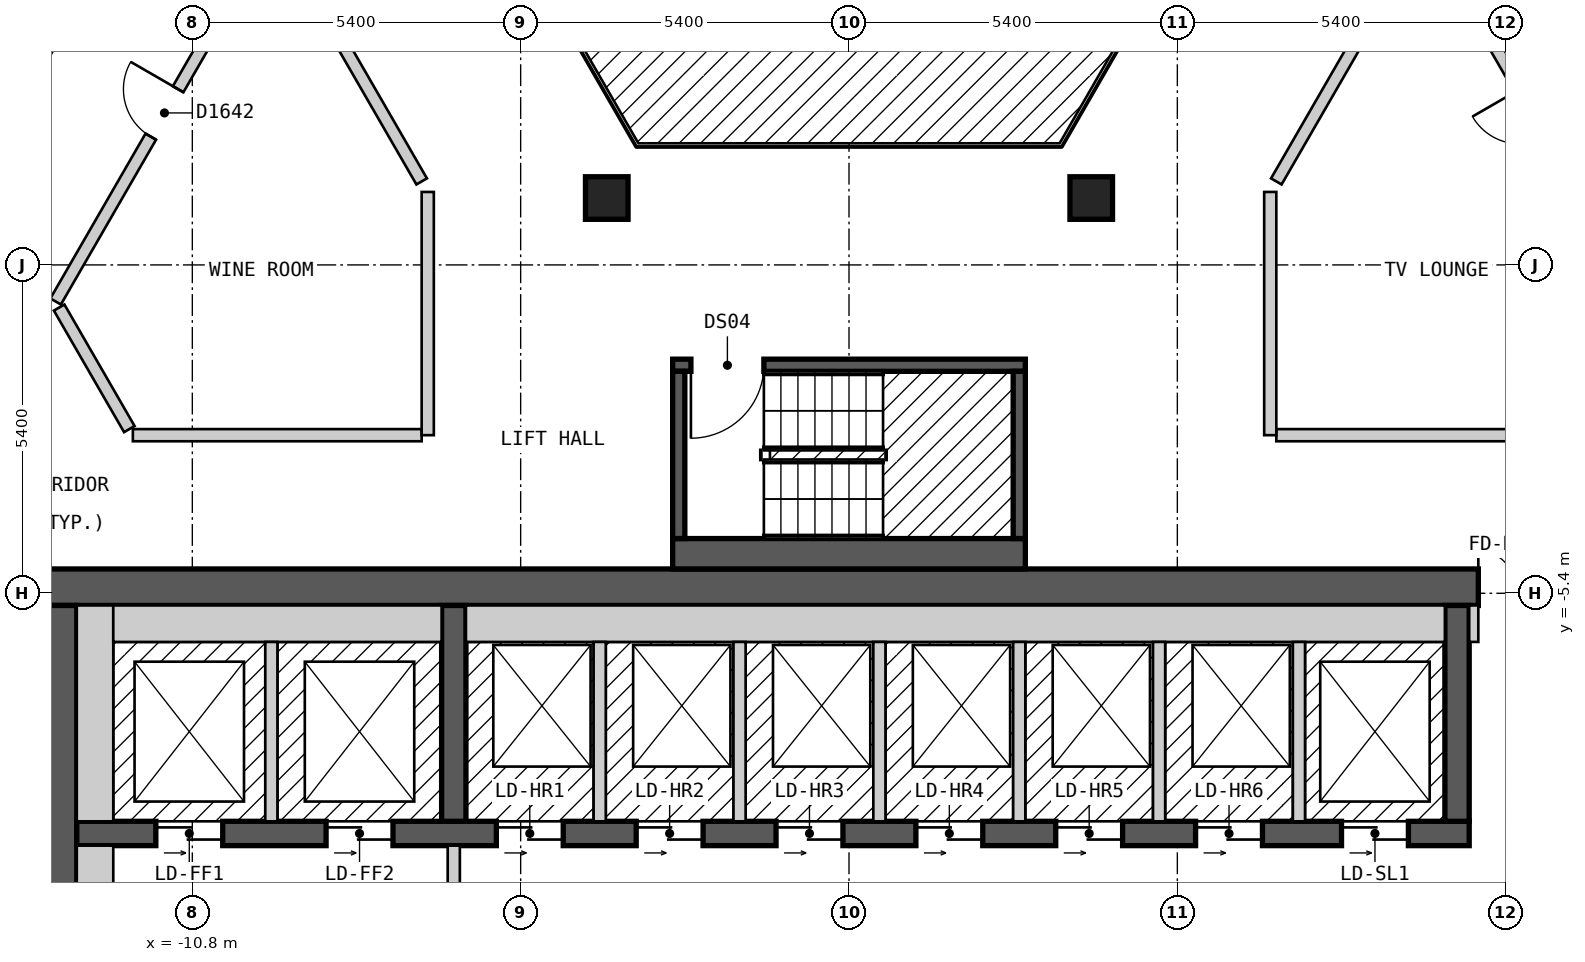
"""IFC4 building model, lengths in metres.
Left out: names, types, materials, properties, quantities, classifications, styles, units other than length and angle.
Written with IfcOpenShell. Run it as: python <this file> out.ifc"""

import sys

from ifc_helpers import new_model, si_unit, direction, frame, frame_2d, origin, origin_2d, place, context, subcontext, project, spatial, rectangle, extrude, element, fill, save


model = new_model("IFC4")
c1 = context("Model", 3, precision=1e-05, world=origin(), true_north=direction((0.0, 1.0)))
c2 = subcontext(c1, "Body", "Model", "MODEL_VIEW")
j1 = project(units=[si_unit("LENGTHUNIT", "METRE"), si_unit("PLANEANGLEUNIT", "RADIAN")], contexts=[c1])
p1 = place(None, origin())
s1 = spatial("IfcSite", under=j1, at=p1, CompositionType="ELEMENT")
p2 = place(p1, origin())
s2 = spatial("IfcBuilding", under=s1, at=p2, CompositionType="ELEMENT")
p3 = place(p2, frame((0.0, 0.0, 169.2)))
s3 = spatial("IfcBuildingStorey", under=s2, at=p3, CompositionType="ELEMENT", Elevation=169.2)
for number, where, z_axis, x_axis in (
    (1, (3.984, 1.1, 0.0), (0.0, 0.0, 1.0), (1.0, 0.0, 0.0)),
    (2, (-3.984, 1.1, 0.0), (0.0, 0.0, 1.0), (1.0, 0.0, 0.0)),
):
    element("IfcColumn", number, at=place(p3, frame(where, z_axis=z_axis, x_axis=x_axis)), inside=s3, PredefinedType="COLUMN", context=c2, shape_type="SweptSolid", body=[
        extrude(rectangle(XDim=0.7, YDim=0.7, at=origin_2d()), origin(), (0.0, 0.0, 1.0), 3.0),
    ])
p4 = place(p3, frame((-13.3, -5.3, 0.0), z_axis=(0.0, 0.0, 1.0), x_axis=(1.0, 0.0, 0.0)))
e3 = element("IfcWall", 3, at=p4, inside=s3, PredefinedType="SHEAR", context=c2, shape_type="SweptSolid", body=[
    extrude(rectangle(XDim=26.6, YDim=0.6, at=frame_2d((13.3, 0.0))), origin(), (0.0, 0.0, 1.0), 2.7),
])
p5 = place(p4, frame((23.65, 0.0, 0.0)))
e4 = element("IfcOpeningElement", 4, at=p5, cuts=e3, PredefinedType="OPENING", context=c2, shape_type="SweptSolid", body=[
    extrude(rectangle(XDim=1.2, YDim=2.1, at=frame_2d((0.6, 1.05))), frame((0.0, 0.31, 0.0), z_axis=(0.0, -1.0, 0.0), x_axis=(1.0, 0.0, 0.0)), (0.0, 0.0, 1.0), 0.62),
])
p6 = place(p3, frame((-13.0, -18.4, 0.0), z_axis=(0.0, 0.0, 1.0), x_axis=(0.0, 1.0, 0.0)))
e5 = element("IfcWall", 5, at=p6, inside=s3, PredefinedType="SHEAR", context=c2, shape_type="SweptSolid", body=[
    extrude(rectangle(XDim=12.8, YDim=0.6, at=frame_2d((6.4, 0.0))), origin(), (0.0, 0.0, 1.0), 2.7),
])
p7 = place(p6, frame((4.2, 0.0, 0.0)))
e6 = element("IfcOpeningElement", 6, at=p7, cuts=e5, PredefinedType="OPENING", context=c2, shape_type="SweptSolid", body=[
    extrude(rectangle(XDim=1.2, YDim=2.1, at=frame_2d((0.6, 1.05))), frame((0.0, 0.31, 0.0), z_axis=(0.0, -1.0, 0.0), x_axis=(1.0, 0.0, 0.0)), (0.0, 0.0, 1.0), 0.62),
])
p8 = place(p3, frame((-12.7, -9.35, 0.0), z_axis=(0.0, 0.0, 1.0), x_axis=(1.0, 0.0, 0.0)))
e7 = element("IfcWall", 7, at=p8, inside=s3, PredefinedType="SHEAR", context=c2, shape_type="SweptSolid", body=[
    extrude(rectangle(XDim=22.9, YDim=0.4, at=frame_2d((11.45, 0.0))), origin(), (0.0, 0.0, 1.0), 2.7),
])
p9 = place(p8, frame((1.3, 0.0, 0.0)))
e8 = element("IfcOpeningElement", 8, at=p9, cuts=e7, PredefinedType="OPENING", context=c2, shape_type="SweptSolid", body=[
    extrude(rectangle(XDim=1.1, YDim=2.1, at=frame_2d((0.55, 1.05))), frame((0.0, 0.21, 0.0), z_axis=(0.0, -1.0, 0.0), x_axis=(1.0, 0.0, 0.0)), (0.0, 0.0, 1.0), 0.42),
])
p10 = place(p8, frame((4.1, 0.0, 0.0)))
e9 = element("IfcOpeningElement", 9, at=p10, cuts=e7, PredefinedType="OPENING", context=c2, shape_type="SweptSolid", body=[
    extrude(rectangle(XDim=1.1, YDim=2.1, at=frame_2d((0.55, 1.05))), frame((0.0, 0.21, 0.0), z_axis=(0.0, -1.0, 0.0), x_axis=(1.0, 0.0, 0.0)), (0.0, 0.0, 1.0), 0.42),
])
p11 = place(p8, frame((6.9, 0.0, 0.0)))
e10 = element("IfcOpeningElement", 10, at=p11, cuts=e7, PredefinedType="OPENING", context=c2, shape_type="SweptSolid", body=[
    extrude(rectangle(XDim=1.1, YDim=2.1, at=frame_2d((0.55, 1.05))), frame((0.0, 0.21, 0.0), z_axis=(0.0, -1.0, 0.0), x_axis=(1.0, 0.0, 0.0)), (0.0, 0.0, 1.0), 0.42),
])
p12 = place(p8, frame((9.2, 0.0, 0.0)))
e11 = element("IfcOpeningElement", 11, at=p12, cuts=e7, PredefinedType="OPENING", context=c2, shape_type="SweptSolid", body=[
    extrude(rectangle(XDim=1.1, YDim=2.1, at=frame_2d((0.55, 1.05))), frame((0.0, 0.21, 0.0), z_axis=(0.0, -1.0, 0.0), x_axis=(1.0, 0.0, 0.0)), (0.0, 0.0, 1.0), 0.42),
])
p13 = place(p8, frame((11.5, 0.0, 0.0)))
e12 = element("IfcOpeningElement", 12, at=p13, cuts=e7, PredefinedType="OPENING", context=c2, shape_type="SweptSolid", body=[
    extrude(rectangle(XDim=1.1, YDim=2.1, at=frame_2d((0.55, 1.05))), frame((0.0, 0.21, 0.0), z_axis=(0.0, -1.0, 0.0), x_axis=(1.0, 0.0, 0.0)), (0.0, 0.0, 1.0), 0.42),
])
p14 = place(p8, frame((13.8, 0.0, 0.0)))
e13 = element("IfcOpeningElement", 13, at=p14, cuts=e7, PredefinedType="OPENING", context=c2, shape_type="SweptSolid", body=[
    extrude(rectangle(XDim=1.1, YDim=2.1, at=frame_2d((0.55, 1.05))), frame((0.0, 0.21, 0.0), z_axis=(0.0, -1.0, 0.0), x_axis=(1.0, 0.0, 0.0)), (0.0, 0.0, 1.0), 0.42),
])
p15 = place(p8, frame((16.1, 0.0, 0.0)))
e14 = element("IfcOpeningElement", 14, at=p15, cuts=e7, PredefinedType="OPENING", context=c2, shape_type="SweptSolid", body=[
    extrude(rectangle(XDim=1.1, YDim=2.1, at=frame_2d((0.55, 1.05))), frame((0.0, 0.21, 0.0), z_axis=(0.0, -1.0, 0.0), x_axis=(1.0, 0.0, 0.0)), (0.0, 0.0, 1.0), 0.42),
])
p16 = place(p8, frame((18.4, 0.0, 0.0)))
e15 = element("IfcOpeningElement", 15, at=p16, cuts=e7, PredefinedType="OPENING", context=c2, shape_type="SweptSolid", body=[
    extrude(rectangle(XDim=1.1, YDim=2.1, at=frame_2d((0.55, 1.05))), frame((0.0, 0.21, 0.0), z_axis=(0.0, -1.0, 0.0), x_axis=(1.0, 0.0, 0.0)), (0.0, 0.0, 1.0), 0.42),
])
p17 = place(p8, frame((20.8, 0.0, 0.0)))
e16 = element("IfcOpeningElement", 16, at=p17, cuts=e7, PredefinedType="OPENING", context=c2, shape_type="SweptSolid", body=[
    extrude(rectangle(XDim=1.1, YDim=2.1, at=frame_2d((0.55, 1.05))), frame((0.0, 0.21, 0.0), z_axis=(0.0, -1.0, 0.0), x_axis=(1.0, 0.0, 0.0)), (0.0, 0.0, 1.0), 0.42),
])
for number, where, z_axis, x_axis in (
    (17, (-6.5, -9.15, 0.0), (0.0, 0.0, 1.0), (0.0, 1.0, 0.0)),
    (18, (10.0, -9.15, 0.0), (0.0, 0.0, 1.0), (0.0, 1.0, 0.0)),
):
    element("IfcWall", number, at=place(p3, frame(where, z_axis=z_axis, x_axis=x_axis)), inside=s3, PredefinedType="SHEAR", context=c2, shape_type="SweptSolid", body=[
        extrude(rectangle(XDim=3.55, YDim=0.4, at=frame_2d((1.775, 0.0))), origin(), (0.0, 0.0, 1.0), 2.7),
    ])
p18 = place(p3, frame((-2.9, -4.75, 0.0), z_axis=(0.0, 0.0, 1.0), x_axis=(1.0, 0.0, 0.0)))
e19 = element("IfcWall", 19, at=p18, inside=s3, PredefinedType="SOLIDWALL", context=c2, shape_type="SweptSolid", body=[
    extrude(rectangle(XDim=5.8, YDim=0.5, at=frame_2d((2.9, 0.0))), origin(), (0.0, 0.0, 1.0), 2.7),
])
p19 = place(p3, frame((-2.9, -1.65, 0.0), z_axis=(0.0, 0.0, 1.0), x_axis=(1.0, 0.0, 0.0)))
e20 = element("IfcWall", 20, at=p19, inside=s3, PredefinedType="SOLIDWALL", context=c2, shape_type="SweptSolid", body=[
    extrude(rectangle(XDim=5.8, YDim=0.2, at=frame_2d((2.9, 0.0))), origin(), (0.0, 0.0, 1.0), 2.7),
])
p20 = place(p19, frame((0.3, 0.0, 0.0)))
e21 = element("IfcOpeningElement", 21, at=p20, cuts=e20, PredefinedType="OPENING", context=c2, shape_type="SweptSolid", body=[
    extrude(rectangle(XDim=1.2, YDim=2.1, at=frame_2d((0.6, 1.05))), frame((0.0, 0.11, 0.0), z_axis=(0.0, -1.0, 0.0), x_axis=(1.0, 0.0, 0.0)), (0.0, 0.0, 1.0), 0.22),
])
for number, where, z_axis, x_axis in (
    (22, (-2.8, -4.5, 0.0), (0.0, 0.0, 1.0), (0.0, 1.0, 0.0)),
    (23, (2.8, -4.5, 0.0), (0.0, 0.0, 1.0), (0.0, 1.0, 0.0)),
):
    element("IfcWall", number, at=place(p3, frame(where, z_axis=z_axis, x_axis=x_axis)), inside=s3, PredefinedType="SOLIDWALL", context=c2, shape_type="SweptSolid", body=[
        extrude(rectangle(XDim=2.75, YDim=0.2, at=frame_2d((1.375, 0.0))), origin(), (0.0, 0.0, 1.0), 2.7),
    ])
p21 = place(p3, frame((-9.411, 5.5, 0.0), z_axis=(0.0, 0.0, 1.0), x_axis=(0.500018099276, -0.86601495391, 0.0)))
e24 = element("IfcWall", 24, at=p21, inside=s3, PredefinedType="PARTITIONING", context=c2, shape_type="SweptSolid", body=[
    extrude(rectangle(XDim=4.765, YDim=0.2, at=frame_2d((2.383, 0.0))), origin(), (0.0, 0.0, 1.0), 2.7),
])
p22 = place(p3, frame((-12.99, -0.701, 0.0), z_axis=(0.0, 0.0, 1.0), x_axis=(0.499972710878, -0.866041158593, 0.0)))
e25 = element("IfcWall", 25, at=p22, inside=s3, PredefinedType="PARTITIONING", context=c2, shape_type="SweptSolid", body=[
    extrude(rectangle(XDim=2.308, YDim=0.2, at=frame_2d((1.154, 0.0))), origin(), (0.0, 0.0, 1.0), 2.7),
])
p23 = place(p3, frame((9.526, 5.5, 0.0), z_axis=(0.0, 0.0, 1.0), x_axis=(0.500062092869, -0.865989551482, 0.0)))
e26 = element("IfcWall", 26, at=p23, inside=s3, PredefinedType="PARTITIONING", context=c2, shape_type="SweptSolid", body=[
    extrude(rectangle(XDim=6.927, YDim=0.2, at=frame_2d((3.464, 0.0))), origin(), (0.0, 0.0, 1.0), 2.7),
])
p24 = place(p23, frame((3.014, 0.0, 0.0)))
e27 = element("IfcOpeningElement", 27, at=p24, cuts=e26, PredefinedType="OPENING", context=c2, shape_type="SweptSolid", body=[
    extrude(rectangle(XDim=0.9, YDim=2.1, at=frame_2d((0.45, 1.05))), frame((0.0, 0.11, 0.0), z_axis=(0.0, -1.0, 0.0), x_axis=(1.0, 0.0, 0.0)), (0.0, 0.0, 1.0), 0.22),
])
p25 = place(p3, frame((10.739, 7.8, 0.0), z_axis=(0.0, 0.0, 1.0), x_axis=(0.499964311759, -0.86604600742, 0.0)))
e28 = element("IfcWall", 28, at=p25, inside=s3, PredefinedType="PARTITIONING", context=c2, shape_type="SweptSolid", body=[
    extrude(rectangle(XDim=9.583, YDim=0.2, at=frame_2d((4.792, 0.0))), origin(), (0.0, 0.0, 1.0), 2.7),
])
p26 = place(p3, frame((-11.778, -2.8, 0.0), z_axis=(0.0, 0.0, 1.0), x_axis=(1.0, 0.0, 0.0)))
e29 = element("IfcWall", 29, at=p26, inside=s3, PredefinedType="PARTITIONING", context=c2, shape_type="SweptSolid", body=[
    extrude(rectangle(XDim=4.75, YDim=0.2, at=frame_2d((2.375, 0.0))), origin(), (0.0, 0.0, 1.0), 2.7),
])
p27 = place(p3, frame((7.028, -2.8, 0.0), z_axis=(0.0, 0.0, 1.0), x_axis=(1.0, 0.0, 0.0)))
e30 = element("IfcWall", 30, at=p27, inside=s3, PredefinedType="PARTITIONING", context=c2, shape_type="SweptSolid", body=[
    extrude(rectangle(XDim=4.634, YDim=0.2, at=frame_2d((2.317, 0.0))), origin(), (0.0, 0.0, 1.0), 2.7),
])
p28 = place(p3, frame((7.028, 1.373, 0.0), z_axis=(0.0, 0.0, 1.0), x_axis=(0.500065924398, 0.86598733897, 0.0)))
e31 = element("IfcWall", 31, at=p28, inside=s3, PredefinedType="PARTITIONING", context=c2, shape_type="SweptSolid", body=[
    extrude(rectangle(XDim=4.881, YDim=0.2, at=frame_2d((2.44, 0.0))), origin(), (0.0, 0.0, 1.0), 2.7),
])
p29 = place(p3, frame((-13.048, -0.601, 0.0), z_axis=(0.0, 0.0, 1.0), x_axis=(0.499982180423, 0.866035691677, 0.0)))
e32 = element("IfcWall", 32, at=p29, inside=s3, PredefinedType="PARTITIONING", context=c2, shape_type="SweptSolid", body=[
    extrude(rectangle(XDim=7.16, YDim=0.2, at=frame_2d((3.58, 0.0))), origin(), (0.0, 0.0, 1.0), 2.7),
])
p30 = place(p29, frame((3.13, 0.0, 0.0)))
e33 = element("IfcOpeningElement", 33, at=p30, cuts=e32, PredefinedType="OPENING", context=c2, shape_type="SweptSolid", body=[
    extrude(rectangle(XDim=0.9, YDim=2.1, at=frame_2d((0.45, 1.05))), frame((0.0, 0.11, 0.0), z_axis=(0.0, -1.0, 0.0), x_axis=(1.0, 0.0, 0.0)), (0.0, 0.0, 1.0), 0.22),
])
p31 = place(p3, frame((-15.53, -0.501, 0.0), z_axis=(0.0, 0.0, 1.0), x_axis=(0.499952498232, 0.866052827206, 0.0)))
e34 = element("IfcWall", 34, at=p31, inside=s3, PredefinedType="PARTITIONING", context=c2, shape_type="SweptSolid", body=[
    extrude(rectangle(XDim=9.585, YDim=0.2, at=frame_2d((4.792, 0.0))), origin(), (0.0, 0.0, 1.0), 2.7),
])
p32 = place(p31, frame((5.031, 0.0, 0.0)))
e35 = element("IfcOpeningElement", 35, at=p32, cuts=e34, PredefinedType="OPENING", context=c2, shape_type="SweptSolid", body=[
    extrude(rectangle(XDim=1.0, YDim=2.1, at=frame_2d((0.5, 1.05))), frame((0.0, 0.11, 0.0), z_axis=(0.0, -1.0, 0.0), x_axis=(1.0, 0.0, 0.0)), (0.0, 0.0, 1.0), 0.22),
])
for number, where, z_axis, x_axis in (
    (36, (6.928, -2.8, 0.0), (0.0, 0.0, 1.0), (0.0, 1.0, 0.0)),
    (37, (-6.928, -2.8, 0.0), (0.0, 0.0, 1.0), (0.0, 1.0, 0.0)),
):
    element("IfcWall", number, at=place(p3, frame(where, z_axis=z_axis, x_axis=x_axis)), inside=s3, PredefinedType="PARTITIONING", context=c2, shape_type="SweptSolid", body=[
        extrude(rectangle(XDim=4.0, YDim=0.2, at=frame_2d((2.0, 0.0))), origin(), (0.0, 0.0, 1.0), 2.7),
    ])
p33 = place(p3, frame((-12.4, -13.0, 0.0), z_axis=(0.0, 0.0, 1.0), x_axis=(0.0, 1.0, 0.0)))
e38 = element("IfcWall", 38, at=p33, inside=s3, PredefinedType="PARTITIONING", context=c2, shape_type="SweptSolid", body=[
    extrude(rectangle(XDim=3.45, YDim=0.6, at=frame_2d((1.725, 0.0))), origin(), (0.0, 0.0, 1.0), 2.7),
])
p34 = place(p3, frame((-12.4, -9.15, 0.0), z_axis=(0.0, 0.0, 1.0), x_axis=(0.0, 1.0, 0.0)))
e39 = element("IfcWall", 39, at=p34, inside=s3, PredefinedType="SOLIDWALL", context=c2, shape_type="SweptSolid", body=[
    extrude(rectangle(XDim=3.55, YDim=0.6, at=frame_2d((1.775, 0.0))), origin(), (0.0, 0.0, 1.0), 2.7),
])
p35 = place(p3, frame((-12.1, -5.9, 0.0), z_axis=(0.0, 0.0, 1.0), x_axis=(1.0, 0.0, 0.0)))
e40 = element("IfcWall", 40, at=p35, inside=s3, PredefinedType="SOLIDWALL", context=c2, shape_type="SweptSolid", body=[
    extrude(rectangle(XDim=5.4, YDim=0.6, at=frame_2d((2.7, 0.0))), origin(), (0.0, 0.0, 1.0), 2.7),
])
p36 = place(p3, frame((-9.5, -9.15, 0.0), z_axis=(0.0, 0.0, 1.0), x_axis=(0.0, 1.0, 0.0)))
e41 = element("IfcWall", 41, at=p36, inside=s3, PredefinedType="SOLIDWALL", context=c2, shape_type="SweptSolid", body=[
    extrude(rectangle(XDim=2.95, YDim=0.2, at=frame_2d((1.475, 0.0))), origin(), (0.0, 0.0, 1.0), 2.7),
])
p37 = place(p3, frame((-6.5, -14.45, 0.0), z_axis=(0.0, 0.0, 1.0), x_axis=(0.0, 1.0, 0.0)))
e42 = element("IfcWall", 42, at=p37, inside=s3, PredefinedType="PARTITIONING", context=c2, shape_type="SweptSolid", body=[
    extrude(rectangle(XDim=4.9, YDim=0.2, at=frame_2d((2.45, 0.0))), origin(), (0.0, 0.0, 1.0), 2.7),
])
p38 = place(p37, frame((3.15, 0.0, 0.0), z_axis=(0.0, 0.0, 1.0), x_axis=(-1.0, 0.0, 0.0)))
e43 = element("IfcOpeningElement", 43, at=p38, cuts=e42, PredefinedType="OPENING", context=c2, shape_type="SweptSolid", body=[
    extrude(rectangle(XDim=1.4, YDim=2.1, at=frame_2d((0.7, 1.05))), frame((0.0, 0.11, 0.0), z_axis=(0.0, -1.0, 0.0), x_axis=(1.0, 0.0, 0.0)), (0.0, 0.0, 1.0), 0.22),
])
p39 = place(p3, frame((-6.3, -5.9, 0.0), z_axis=(0.0, 0.0, 1.0), x_axis=(1.0, 0.0, 0.0)))
e44 = element("IfcWall", 44, at=p39, inside=s3, PredefinedType="SOLIDWALL", context=c2, shape_type="SweptSolid", body=[
    extrude(rectangle(XDim=16.1, YDim=0.6, at=frame_2d((8.05, 0.0))), origin(), (0.0, 0.0, 1.0), 2.7),
])
for number, where, z_axis, x_axis in (
    (45, (-4.1, -9.15, 0.0), (0.0, 0.0, 1.0), (0.0, 1.0, 0.0)),
    (46, (-1.8, -9.15, 0.0), (0.0, 0.0, 1.0), (0.0, 1.0, 0.0)),
    (47, (0.5, -9.15, 0.0), (0.0, 0.0, 1.0), (0.0, 1.0, 0.0)),
    (48, (2.8, -9.15, 0.0), (0.0, 0.0, 1.0), (0.0, 1.0, 0.0)),
    (49, (5.1, -9.15, 0.0), (0.0, 0.0, 1.0), (0.0, 1.0, 0.0)),
    (50, (7.4, -9.15, 0.0), (0.0, 0.0, 1.0), (0.0, 1.0, 0.0)),
):
    element("IfcWall", number, at=place(p3, frame(where, z_axis=z_axis, x_axis=x_axis)), inside=s3, PredefinedType="SOLIDWALL", context=c2, shape_type="SweptSolid", body=[
        extrude(rectangle(XDim=2.95, YDim=0.2, at=frame_2d((1.475, 0.0))), origin(), (0.0, 0.0, 1.0), 2.7),
    ])
p40 = place(p3, frame((10.275, -6.2, 0.0), z_axis=(0.0, 0.0, 1.0), x_axis=(0.0, 1.0, 0.0)))
e51 = element("IfcWall", 51, at=p40, inside=s3, PredefinedType="PARTITIONING", context=c2, shape_type="SweptSolid", body=[
    extrude(rectangle(XDim=0.6, YDim=0.15, at=frame_2d((0.3, 0.0))), origin(), (0.0, 0.0, 1.0), 2.7),
])
p41 = place(p20, origin())
e52 = element("IfcDoor", 52, at=p41, inside=s3, OperationType="SINGLE_SWING_LEFT", PredefinedType="DOOR", context=c2, shape_type="SweptSolid", body=[
    extrude(rectangle(XDim=1.2, YDim=2.1, at=frame_2d((0.6, 1.05))), frame((0.0, 0.025, 0.0), z_axis=(0.0, -1.0, 0.0), x_axis=(1.0, 0.0, 0.0)), (0.0, 0.0, 1.0), 0.05),
])
fill(e21, e52)
p42 = place(p30, origin())
e53 = element("IfcDoor", 53, at=p42, inside=s3, OperationType="SINGLE_SWING_RIGHT", PredefinedType="DOOR", context=c2, shape_type="SweptSolid", body=[
    extrude(rectangle(XDim=0.9, YDim=2.1, at=frame_2d((0.45, 1.05))), frame((0.0, 0.025, 0.0), z_axis=(0.0, -1.0, 0.0), x_axis=(1.0, 0.0, 0.0)), (0.0, 0.0, 1.0), 0.05),
])
fill(e33, e53)
p43 = place(p9, origin())
e54 = element("IfcDoor", 54, at=p43, inside=s3, OperationType="DOUBLE_DOOR_SLIDING", PredefinedType="DOOR", context=c2, shape_type="SweptSolid", body=[
    extrude(rectangle(XDim=1.1, YDim=2.1, at=frame_2d((0.55, 1.05))), frame((0.0, 0.025, 0.0), z_axis=(0.0, -1.0, 0.0), x_axis=(1.0, 0.0, 0.0)), (0.0, 0.0, 1.0), 0.05),
])
fill(e8, e54)
p44 = place(p10, origin())
e55 = element("IfcDoor", 55, at=p44, inside=s3, OperationType="DOUBLE_DOOR_SLIDING", PredefinedType="DOOR", context=c2, shape_type="SweptSolid", body=[
    extrude(rectangle(XDim=1.1, YDim=2.1, at=frame_2d((0.55, 1.05))), frame((0.0, 0.025, 0.0), z_axis=(0.0, -1.0, 0.0), x_axis=(1.0, 0.0, 0.0)), (0.0, 0.0, 1.0), 0.05),
])
fill(e9, e55)
p45 = place(p11, origin())
e56 = element("IfcDoor", 56, at=p45, inside=s3, OperationType="DOUBLE_DOOR_SLIDING", PredefinedType="DOOR", context=c2, shape_type="SweptSolid", body=[
    extrude(rectangle(XDim=1.1, YDim=2.1, at=frame_2d((0.55, 1.05))), frame((0.0, 0.025, 0.0), z_axis=(0.0, -1.0, 0.0), x_axis=(1.0, 0.0, 0.0)), (0.0, 0.0, 1.0), 0.05),
])
fill(e10, e56)
p46 = place(p12, origin())
e57 = element("IfcDoor", 57, at=p46, inside=s3, OperationType="DOUBLE_DOOR_SLIDING", PredefinedType="DOOR", context=c2, shape_type="SweptSolid", body=[
    extrude(rectangle(XDim=1.1, YDim=2.1, at=frame_2d((0.55, 1.05))), frame((0.0, 0.025, 0.0), z_axis=(0.0, -1.0, 0.0), x_axis=(1.0, 0.0, 0.0)), (0.0, 0.0, 1.0), 0.05),
])
fill(e11, e57)
p47 = place(p13, origin())
e58 = element("IfcDoor", 58, at=p47, inside=s3, OperationType="DOUBLE_DOOR_SLIDING", PredefinedType="DOOR", context=c2, shape_type="SweptSolid", body=[
    extrude(rectangle(XDim=1.1, YDim=2.1, at=frame_2d((0.55, 1.05))), frame((0.0, 0.025, 0.0), z_axis=(0.0, -1.0, 0.0), x_axis=(1.0, 0.0, 0.0)), (0.0, 0.0, 1.0), 0.05),
])
fill(e12, e58)
p48 = place(p14, origin())
e59 = element("IfcDoor", 59, at=p48, inside=s3, OperationType="DOUBLE_DOOR_SLIDING", PredefinedType="DOOR", context=c2, shape_type="SweptSolid", body=[
    extrude(rectangle(XDim=1.1, YDim=2.1, at=frame_2d((0.55, 1.05))), frame((0.0, 0.025, 0.0), z_axis=(0.0, -1.0, 0.0), x_axis=(1.0, 0.0, 0.0)), (0.0, 0.0, 1.0), 0.05),
])
fill(e13, e59)
p49 = place(p15, origin())
e60 = element("IfcDoor", 60, at=p49, inside=s3, OperationType="DOUBLE_DOOR_SLIDING", PredefinedType="DOOR", context=c2, shape_type="SweptSolid", body=[
    extrude(rectangle(XDim=1.1, YDim=2.1, at=frame_2d((0.55, 1.05))), frame((0.0, 0.025, 0.0), z_axis=(0.0, -1.0, 0.0), x_axis=(1.0, 0.0, 0.0)), (0.0, 0.0, 1.0), 0.05),
])
fill(e14, e60)
p50 = place(p16, origin())
e61 = element("IfcDoor", 61, at=p50, inside=s3, OperationType="DOUBLE_DOOR_SLIDING", PredefinedType="DOOR", context=c2, shape_type="SweptSolid", body=[
    extrude(rectangle(XDim=1.1, YDim=2.1, at=frame_2d((0.55, 1.05))), frame((0.0, 0.025, 0.0), z_axis=(0.0, -1.0, 0.0), x_axis=(1.0, 0.0, 0.0)), (0.0, 0.0, 1.0), 0.05),
])
fill(e15, e61)
p51 = place(p17, origin())
e62 = element("IfcDoor", 62, at=p51, inside=s3, OperationType="DOUBLE_DOOR_SLIDING", PredefinedType="DOOR", context=c2, shape_type="SweptSolid", body=[
    extrude(rectangle(XDim=1.1, YDim=2.1, at=frame_2d((0.55, 1.05))), frame((0.0, 0.025, 0.0), z_axis=(0.0, -1.0, 0.0), x_axis=(1.0, 0.0, 0.0)), (0.0, 0.0, 1.0), 0.05),
])
fill(e16, e62)
p52 = place(p5, origin())
e63 = element("IfcDoor", 63, at=p52, inside=s3, OperationType="DOUBLE_DOOR_SINGLE_SWING", PredefinedType="DOOR", context=c2, shape_type="SweptSolid", body=[
    extrude(rectangle(XDim=1.2, YDim=2.1, at=frame_2d((0.6, 1.05))), frame((0.0, 0.025, 0.0), z_axis=(0.0, -1.0, 0.0), x_axis=(1.0, 0.0, 0.0)), (0.0, 0.0, 1.0), 0.05),
])
fill(e4, e63)
save(model, sys.argv[1])
